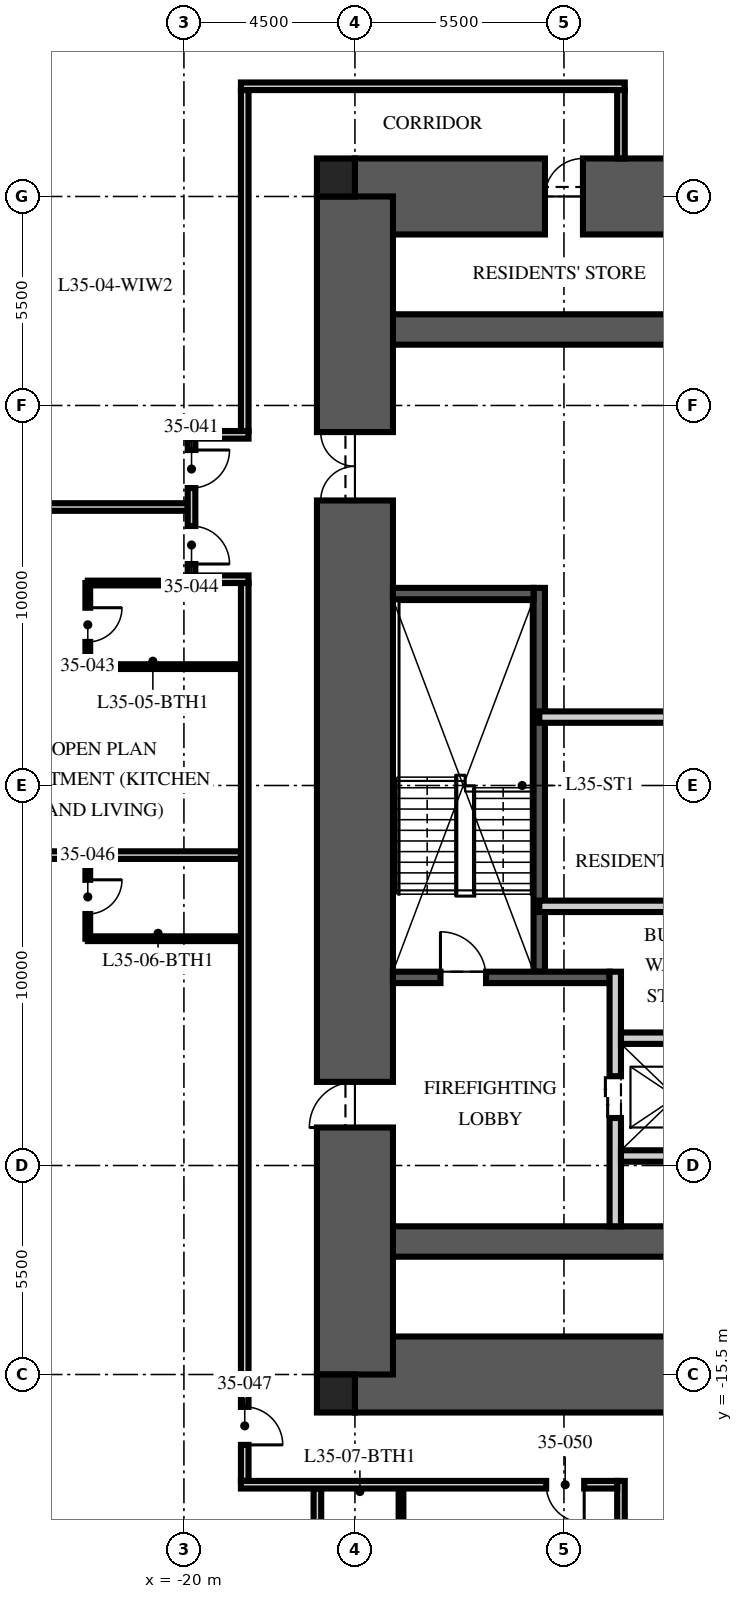
"""IFC4 building model, lengths in metres.
Left out: names, types, materials, properties, quantities, classifications, styles, units other than length and angle.
Written with IfcOpenShell. Run it as: python <this file> out.ifc"""

import sys

from ifc_helpers import new_model, si_unit, direction, frame, frame_2d, origin, origin_2d, place, context, subcontext, project, spatial, rectangle, extrude, element, fill, save


model = new_model("IFC4")
c1 = context("Model", 3, precision=1e-05, world=origin(), true_north=direction((0.0, 1.0)))
c2 = subcontext(c1, "Body", "Model", "MODEL_VIEW")
j1 = project(units=[si_unit("LENGTHUNIT", "METRE"), si_unit("PLANEANGLEUNIT", "RADIAN")], contexts=[c1])
p1 = place(None, origin())
s1 = spatial("IfcSite", under=j1, at=p1, CompositionType="ELEMENT")
p2 = place(p1, origin())
s2 = spatial("IfcBuilding", under=s1, at=p2, CompositionType="ELEMENT")
p3 = place(p2, frame((0.0, 0.0, 141.0)))
s3 = spatial("IfcBuildingStorey", under=s2, at=p3, CompositionType="ELEMENT", Elevation=141.0)
p4 = place(p3, frame((-15.5, 15.5, -0.25), z_axis=(0.0, 0.0, 1.0), x_axis=(1.0, 0.0, 0.0)))
e1 = element("IfcWall", 1, at=p4, inside=s3, PredefinedType="SHEAR", context=c2, shape_type="SweptSolid", body=[
    extrude(rectangle(XDim=31.0, YDim=2.0, at=frame_2d((15.5, 0.0))), origin(), (0.0, 0.0, 1.0), 3.75),
])
p5 = place(p4, frame((5.0, 0.0, 0.25)))
e2 = element("IfcOpeningElement", 2, at=p5, cuts=e1, PredefinedType="OPENING", context=c2, shape_type="SweptSolid", body=[
    extrude(rectangle(XDim=1.0, YDim=2.1, at=frame_2d((0.5, 1.05))), frame((0.0, 1.01, 0.0), z_axis=(0.0, -1.0, 0.0), x_axis=(1.0, 0.0, 0.0)), (0.0, 0.0, 1.0), 2.02),
])
p6 = place(p3, frame((-15.5, -15.5, -0.25), z_axis=(0.0, 0.0, 1.0), x_axis=(1.0, 0.0, 0.0)))
e3 = element("IfcWall", 3, at=p6, inside=s3, PredefinedType="SHEAR", context=c2, shape_type="SweptSolid", body=[
    extrude(rectangle(XDim=31.0, YDim=2.0, at=frame_2d((15.5, 0.0))), origin(), (0.0, 0.0, 1.0), 3.75),
])
p7 = place(p6, frame((10.4, 0.0, 0.25)))
e4 = element("IfcOpeningElement", 4, at=p7, cuts=e3, PredefinedType="OPENING", context=c2, shape_type="SweptSolid", body=[
    extrude(rectangle(XDim=1.1, YDim=2.1, at=frame_2d((0.55, 1.05))), frame((0.0, 1.01, 0.0), z_axis=(0.0, -1.0, 0.0), x_axis=(1.0, 0.0, 0.0)), (0.0, 0.0, 1.0), 2.02),
])
p8 = place(p6, frame((13.5, 0.0, 0.25)))
e5 = element("IfcOpeningElement", 5, at=p8, cuts=e3, PredefinedType="OPENING", context=c2, shape_type="SweptSolid", body=[
    extrude(rectangle(XDim=1.1, YDim=2.1, at=frame_2d((0.55, 1.05))), frame((0.0, 1.01, 0.0), z_axis=(0.0, -1.0, 0.0), x_axis=(1.0, 0.0, 0.0)), (0.0, 0.0, 1.0), 2.02),
])
p9 = place(p6, frame((16.6, 0.0, 0.25)))
e6 = element("IfcOpeningElement", 6, at=p9, cuts=e3, PredefinedType="OPENING", context=c2, shape_type="SweptSolid", body=[
    extrude(rectangle(XDim=1.1, YDim=2.1, at=frame_2d((0.55, 1.05))), frame((0.0, 1.01, 0.0), z_axis=(0.0, -1.0, 0.0), x_axis=(1.0, 0.0, 0.0)), (0.0, 0.0, 1.0), 2.02),
])
for number, where, z_axis, x_axis in (
    (7, (-15.5, 12.0, -0.25), (0.0, 0.0, 1.0), (1.0, 0.0, 0.0)),
    (8, (-15.5, -12.0, -0.25), (0.0, 0.0, 1.0), (1.0, 0.0, 0.0)),
):
    element("IfcWall", number, at=place(p3, frame(where, z_axis=z_axis, x_axis=x_axis)), inside=s3, PredefinedType="SHEAR", context=c2, shape_type="SweptSolid", body=[
        extrude(rectangle(XDim=31.0, YDim=0.8, at=frame_2d((15.5, 0.0))), origin(), (0.0, 0.0, 1.0), 3.75),
    ])
p10 = place(p3, frame((-15.5, -15.5, -0.25), z_axis=(0.0, 0.0, 1.0), x_axis=(0.0, 1.0, 0.0)))
e9 = element("IfcWall", 9, at=p10, inside=s3, PredefinedType="SHEAR", context=c2, shape_type="SweptSolid", body=[
    extrude(rectangle(XDim=31.0, YDim=2.0, at=frame_2d((15.5, 0.0))), origin(), (0.0, 0.0, 1.0), 3.75),
])
p11 = place(p10, frame((6.5, 0.0, 0.25)))
e10 = element("IfcOpeningElement", 10, at=p11, cuts=e9, PredefinedType="OPENING", context=c2, shape_type="SweptSolid", body=[
    extrude(rectangle(XDim=1.2, YDim=2.1, at=frame_2d((0.6, 1.05))), frame((0.0, 1.01, 0.0), z_axis=(0.0, -1.0, 0.0), x_axis=(1.0, 0.0, 0.0)), (0.0, 0.0, 1.0), 2.02),
])
p12 = place(p10, frame((23.0, 0.0, 0.25)))
e11 = element("IfcOpeningElement", 11, at=p12, cuts=e9, PredefinedType="OPENING", context=c2, shape_type="SweptSolid", body=[
    extrude(rectangle(XDim=1.8, YDim=2.1, at=frame_2d((0.9, 1.05))), frame((0.0, 1.01, 0.0), z_axis=(0.0, -1.0, 0.0), x_axis=(1.0, 0.0, 0.0)), (0.0, 0.0, 1.0), 2.02),
])
for number, where, z_axis, x_axis in (
    (12, (-16.0, 16.0, -0.25), (0.0, 0.0, 1.0), (1.0, 0.0, 0.0)),
    (13, (-16.0, -16.0, -0.25), (0.0, 0.0, 1.0), (1.0, 0.0, 0.0)),
):
    element("IfcColumn", number, at=place(p3, frame(where, z_axis=z_axis, x_axis=x_axis)), inside=s3, PredefinedType="COLUMN", context=c2, shape_type="SweptSolid", body=[
        extrude(rectangle(XDim=1.0, YDim=1.0, at=origin_2d()), origin(), (0.0, 0.0, 1.0), 3.75),
    ])
p13 = place(p3, frame((-10.65, -4.9, 0.0), z_axis=(0.0, 0.0, 1.0), x_axis=(0.0, 1.0, 0.0)))
e14 = element("IfcWall", 14, at=p13, inside=s3, PredefinedType="SOLIDWALL", context=c2, shape_type="SweptSolid", body=[
    extrude(rectangle(XDim=10.1, YDim=0.3, at=frame_2d((5.05, 0.0))), origin(), (0.0, 0.0, 1.0), 3.5),
])
p14 = place(p3, frame((-14.5, -5.05, 0.0), z_axis=(0.0, 0.0, 1.0), x_axis=(1.0, 0.0, 0.0)))
e15 = element("IfcWall", 15, at=p14, inside=s3, PredefinedType="SOLIDWALL", context=c2, shape_type="SweptSolid", body=[
    extrude(rectangle(XDim=5.7, YDim=0.3, at=frame_2d((2.85, 0.0))), origin(), (0.0, 0.0, 1.0), 3.5),
])
p15 = place(p14, frame((1.25, 0.0, 0.0)))
e16 = element("IfcOpeningElement", 16, at=p15, cuts=e15, PredefinedType="OPENING", context=c2, shape_type="SweptSolid", body=[
    extrude(rectangle(XDim=1.2, YDim=2.1, at=frame_2d((0.6, 1.05))), frame((0.0, 0.16, 0.0), z_axis=(0.0, -1.0, 0.0), x_axis=(1.0, 0.0, 0.0)), (0.0, 0.0, 1.0), 0.32),
])
p16 = place(p3, frame((-14.5, 5.05, 0.0), z_axis=(0.0, 0.0, 1.0), x_axis=(1.0, 0.0, 0.0)))
e17 = element("IfcWall", 17, at=p16, inside=s3, PredefinedType="SOLIDWALL", context=c2, shape_type="SweptSolid", body=[
    extrude(rectangle(XDim=3.7, YDim=0.3, at=frame_2d((1.85, 0.0))), origin(), (0.0, 0.0, 1.0), 3.5),
])
p17 = place(p3, frame((-8.65, -11.6, 0.0), z_axis=(0.0, 0.0, 1.0), x_axis=(0.0, 1.0, 0.0)))
e18 = element("IfcWall", 18, at=p17, inside=s3, PredefinedType="PARTITIONING", context=c2, shape_type="SweptSolid", body=[
    extrude(rectangle(XDim=6.7, YDim=0.3, at=frame_2d((3.35, 0.0))), origin(), (0.0, 0.0, 1.0), 3.5),
])
p18 = place(p17, frame((2.85, 0.0, 0.0)))
e19 = element("IfcOpeningElement", 19, at=p18, cuts=e18, PredefinedType="OPENING", context=c2, shape_type="SweptSolid", body=[
    extrude(rectangle(XDim=1.1, YDim=2.1, at=frame_2d((0.55, 1.05))), frame((0.0, 0.16, 0.0), z_axis=(0.0, -1.0, 0.0), x_axis=(1.0, 0.0, 0.0)), (0.0, 0.0, 1.0), 0.32),
])
p19 = place(p3, frame((-8.5, -6.65, 0.0), z_axis=(0.0, 0.0, 1.0), x_axis=(1.0, 0.0, 0.0)))
e20 = element("IfcWall", 20, at=p19, inside=s3, PredefinedType="PARTITIONING", context=c2, shape_type="SweptSolid", body=[
    extrude(rectangle(XDim=17.0, YDim=0.3, at=frame_2d((8.5, 0.0))), origin(), (0.0, 0.0, 1.0), 3.5),
])
p20 = place(p19, frame((7.8, 0.0, 0.0)))
e21 = element("IfcOpeningElement", 21, at=p20, cuts=e20, PredefinedType="OPENING", context=c2, shape_type="SweptSolid", body=[
    extrude(rectangle(XDim=1.3, YDim=2.4, at=frame_2d((0.65, 1.2))), frame((0.0, 0.16, 0.0), z_axis=(0.0, -1.0, 0.0), x_axis=(1.0, 0.0, 0.0)), (0.0, 0.0, 1.0), 0.32),
])
p21 = place(p19, frame((5.65, 0.0, 0.0)))
e22 = element("IfcOpeningElement", 22, at=p21, cuts=e20, PredefinedType="OPENING", context=c2, shape_type="SweptSolid", body=[
    extrude(rectangle(XDim=0.9, YDim=2.1, at=frame_2d((0.45, 1.05))), frame((0.0, 0.16, 0.0), z_axis=(0.0, -1.0, 0.0), x_axis=(1.0, 0.0, 0.0)), (0.0, 0.0, 1.0), 0.32),
])
p22 = place(p19, frame((10.4, 0.0, 0.0)))
e23 = element("IfcOpeningElement", 23, at=p22, cuts=e20, PredefinedType="OPENING", context=c2, shape_type="SweptSolid", body=[
    extrude(rectangle(XDim=0.9, YDim=2.1, at=frame_2d((0.45, 1.05))), frame((0.0, 0.16, 0.0), z_axis=(0.0, -1.0, 0.0), x_axis=(1.0, 0.0, 0.0)), (0.0, 0.0, 1.0), 0.32),
])
p23 = place(p3, frame((-8.5, -9.75, 0.0), z_axis=(0.0, 0.0, 1.0), x_axis=(1.0, 0.0, 0.0)))
e24 = element("IfcWall", 24, at=p23, inside=s3, PredefinedType="PARTITIONING", context=c2, shape_type="SweptSolid", body=[
    extrude(rectangle(XDim=2.9, YDim=0.3, at=frame_2d((1.45, 0.0))), origin(), (0.0, 0.0, 1.0), 3.5),
])
p24 = place(p3, frame((-10.65, 1.8, 0.0), z_axis=(0.0, 0.0, 1.0), x_axis=(1.0, 0.0, 0.0)))
e25 = element("IfcWall", 25, at=p24, inside=s3, PredefinedType="PARTITIONING", context=c2, shape_type="SweptSolid", body=[
    extrude(rectangle(XDim=21.3, YDim=0.3, at=frame_2d((10.65, 0.0))), origin(), (0.0, 0.0, 1.0), 3.5),
])
p25 = place(p24, frame((10.05, 0.0, 0.0)))
e26 = element("IfcOpeningElement", 26, at=p25, cuts=e25, PredefinedType="OPENING", context=c2, shape_type="SweptSolid", body=[
    extrude(rectangle(XDim=1.2, YDim=2.1, at=frame_2d((0.6, 1.05))), frame((0.0, 0.16, 0.0), z_axis=(0.0, -1.0, 0.0), x_axis=(1.0, 0.0, 0.0)), (0.0, 0.0, 1.0), 0.32),
])
p26 = place(p24, frame((19.238, 0.0, 0.0)))
e27 = element("IfcOpeningElement", 27, at=p26, cuts=e25, PredefinedType="OPENING", context=c2, shape_type="SweptSolid", body=[
    extrude(rectangle(XDim=0.9, YDim=2.1, at=frame_2d((0.45, 1.05))), frame((0.0, 0.16, 0.0), z_axis=(0.0, -1.0, 0.0), x_axis=(1.0, 0.0, 0.0)), (0.0, 0.0, 1.0), 0.32),
])
p27 = place(p3, frame((-10.65, -3.18, 0.0), z_axis=(0.0, 0.0, 1.0), x_axis=(1.0, 0.0, 0.0)))
e28 = element("IfcWall", 28, at=p27, inside=s3, PredefinedType="PARTITIONING", context=c2, shape_type="SweptSolid", body=[
    extrude(rectangle(XDim=6.45, YDim=0.3, at=frame_2d((3.225, 0.0))), origin(), (0.0, 0.0, 1.0), 3.5),
])
p28 = place(p3, frame((-18.5, 18.4, 0.0), z_axis=(0.0, 0.0, 1.0), x_axis=(1.0, 0.0, 0.0)))
e29 = element("IfcWall", 29, at=p28, inside=s3, PredefinedType="PARTITIONING", context=c2, shape_type="SweptSolid", body=[
    extrude(rectangle(XDim=10.1, YDim=0.2, at=frame_2d((5.05, 0.0))), origin(), (0.0, 0.0, 1.0), 2.3),
])
p29 = place(p3, frame((-8.5, 18.3, 0.0), z_axis=(0.0, 0.0, 1.0), x_axis=(0.0, -1.0, 0.0)))
e30 = element("IfcWall", 30, at=p29, inside=s3, PredefinedType="PARTITIONING", context=c2, shape_type="SweptSolid", body=[
    extrude(rectangle(XDim=1.8, YDim=0.2, at=frame_2d((0.9, 0.0))), origin(), (0.0, 0.0, 1.0), 3.5),
])
p30 = place(p3, frame((-19.9, 7.328, 0.0), z_axis=(0.0, 0.0, 1.0), x_axis=(-1.0, 0.0, 0.0)))
e31 = element("IfcWall", 31, at=p30, inside=s3, PredefinedType="PARTITIONING", context=c2, shape_type="SweptSolid", body=[
    extrude(rectangle(XDim=8.75, YDim=0.2, at=frame_2d((4.375, 0.0))), origin(), (0.0, 0.0, 1.0), 2.81),
])
for number, where, z_axis, x_axis in (
    (32, (-18.5, -1.832, 0.0), (0.0, 0.0, 1.0), (-1.0, 0.0, 0.0)),
    (33, (-16.488, -18.5, 0.0), (0.0, 0.0, 1.0), (0.0, -1.0, 0.0)),
):
    element("IfcWall", number, at=place(p3, frame(where, z_axis=z_axis, x_axis=x_axis)), inside=s3, PredefinedType="PARTITIONING", context=c2, shape_type="SweptSolid", body=[
        extrude(rectangle(XDim=10.15, YDim=0.2, at=frame_2d((5.075, 0.0))), origin(), (0.0, 0.0, 1.0), 2.81),
    ])
p31 = place(p3, frame((-22.53, 5.328, 0.0), z_axis=(0.0, 0.0, 1.0), x_axis=(0.0, -1.0, 0.0)))
e34 = element("IfcWall", 34, at=p31, inside=s3, PredefinedType="PARTITIONING", context=c2, shape_type="SweptSolid", body=[
    extrude(rectangle(XDim=2.2, YDim=0.125, at=frame_2d((1.1, 0.0))), origin(), (0.0, 0.0, 1.0), 2.81),
])
p32 = place(p31, frame((0.65, 0.0, 0.0)))
e35 = element("IfcOpeningElement", 35, at=p32, cuts=e34, PredefinedType="OPENING", context=c2, shape_type="SweptSolid", body=[
    extrude(rectangle(XDim=0.9, YDim=2.1, at=frame_2d((0.45, 1.05))), frame((0.0, 0.073, 0.0), z_axis=(0.0, -1.0, 0.0), x_axis=(1.0, 0.0, 0.0)), (0.0, 0.0, 1.0), 0.145),
])
p33 = place(p3, frame((-19.97, 5.328, 0.0), z_axis=(0.0, 0.0, 1.0), x_axis=(-1.0, 0.0, 0.0)))
e36 = element("IfcWall", 36, at=p33, inside=s3, PredefinedType="PARTITIONING", context=c2, shape_type="SweptSolid", body=[
    extrude(rectangle(XDim=2.56, YDim=0.125, at=frame_2d((1.28, 0.0))), origin(), (0.0, 0.0, 1.0), 3.5),
])
p34 = place(p3, frame((-18.5, 3.128, 0.0), z_axis=(0.0, 0.0, 1.0), x_axis=(-1.0, 0.0, 0.0)))
e37 = element("IfcWall", 37, at=p34, inside=s3, PredefinedType="PARTITIONING", context=c2, shape_type="SweptSolid", body=[
    extrude(rectangle(XDim=4.03, YDim=0.125, at=frame_2d((2.015, 0.0))), origin(), (0.0, 0.0, 1.0), 3.5),
])
p35 = place(p3, frame((-22.53, -1.832, 0.0), z_axis=(0.0, 0.0, 1.0), x_axis=(0.0, -1.0, 0.0)))
e38 = element("IfcWall", 38, at=p35, inside=s3, PredefinedType="PARTITIONING", context=c2, shape_type="SweptSolid", body=[
    extrude(rectangle(XDim=2.2, YDim=0.125, at=frame_2d((1.1, 0.0))), origin(), (0.0, 0.0, 1.0), 3.5),
])
p36 = place(p35, frame((0.65, 0.0, 0.0)))
e39 = element("IfcOpeningElement", 39, at=p36, cuts=e38, PredefinedType="OPENING", context=c2, shape_type="SweptSolid", body=[
    extrude(rectangle(XDim=0.9, YDim=2.1, at=frame_2d((0.45, 1.05))), frame((0.0, 0.073, 0.0), z_axis=(0.0, -1.0, 0.0), x_axis=(1.0, 0.0, 0.0)), (0.0, 0.0, 1.0), 0.145),
])
for number, where, z_axis, x_axis in (
    (40, (-18.5, -4.032, 0.0), (0.0, 0.0, 1.0), (-1.0, 0.0, 0.0)),
    (41, (-14.288, -18.5, 0.0), (0.0, 0.0, 1.0), (0.0, -1.0, 0.0)),
):
    element("IfcWall", number, at=place(p3, frame(where, z_axis=z_axis, x_axis=x_axis)), inside=s3, PredefinedType="PARTITIONING", context=c2, shape_type="SweptSolid", body=[
        extrude(rectangle(XDim=4.03, YDim=0.125, at=frame_2d((2.015, 0.0))), origin(), (0.0, 0.0, 1.0), 3.5),
    ])
p37 = place(p3, frame((-18.4, 18.3, 0.0), z_axis=(0.0, 0.0, 1.0), x_axis=(0.0, -1.0, 0.0)))
e42 = element("IfcWall", 42, at=p37, inside=s3, PredefinedType="PARTITIONING", context=c2, shape_type="SweptSolid", body=[
    extrude(rectangle(XDim=8.972, YDim=0.2, at=frame_2d((4.486, 0.0))), origin(), (0.0, 0.0, 1.0), 2.3),
])
p38 = place(p3, frame((-18.3, 9.228, 0.0), z_axis=(0.0, 0.0, 1.0), x_axis=(-1.0, 0.0, 0.0)))
e43 = element("IfcWall", 43, at=p38, inside=s3, PredefinedType="PARTITIONING", context=c2, shape_type="SweptSolid", body=[
    extrude(rectangle(XDim=1.6, YDim=0.2, at=frame_2d((0.8, 0.0))), origin(), (0.0, 0.0, 1.0), 2.7),
])
p39 = place(p3, frame((-18.3, 5.428, 0.0), z_axis=(0.0, 0.0, 1.0), x_axis=(-1.0, 0.0, 0.0)))
e44 = element("IfcWall", 44, at=p39, inside=s3, PredefinedType="PARTITIONING", context=c2, shape_type="SweptSolid", body=[
    extrude(rectangle(XDim=1.6, YDim=0.2, at=frame_2d((0.8, 0.0))), origin(), (0.0, 0.0, 1.0), 3.5),
])
p40 = place(p3, frame((-19.8, 9.128, 0.0), z_axis=(0.0, 0.0, 1.0), x_axis=(0.0, -1.0, 0.0)))
e45 = element("IfcWall", 45, at=p40, inside=s3, PredefinedType="PARTITIONING", context=c2, shape_type="SweptSolid", body=[
    extrude(rectangle(XDim=3.6, YDim=0.2, at=frame_2d((1.8, 0.0))), origin(), (0.0, 0.0, 1.0), 2.7),
])
p41 = place(p40, frame((0.3, 0.0, 0.0)))
e46 = element("IfcOpeningElement", 46, at=p41, cuts=e45, PredefinedType="OPENING", context=c2, shape_type="SweptSolid", body=[
    extrude(rectangle(XDim=1.0, YDim=2.2, at=frame_2d((0.5, 1.1))), frame((0.0, 0.11, 0.0), z_axis=(0.0, -1.0, 0.0), x_axis=(1.0, 0.0, 0.0)), (0.0, 0.0, 1.0), 0.22),
])
p42 = place(p40, frame((2.3, 0.0, 0.0)))
e47 = element("IfcOpeningElement", 47, at=p42, cuts=e45, PredefinedType="OPENING", context=c2, shape_type="SweptSolid", body=[
    extrude(rectangle(XDim=1.0, YDim=2.2, at=frame_2d((0.5, 1.1))), frame((0.0, 0.11, 0.0), z_axis=(0.0, -1.0, 0.0), x_axis=(1.0, 0.0, 0.0)), (0.0, 0.0, 1.0), 0.22),
])
p43 = place(p3, frame((-18.4, 5.328, 0.0), z_axis=(0.0, 0.0, 1.0), x_axis=(0.0, -1.0, 0.0)))
e48 = element("IfcWall", 48, at=p43, inside=s3, PredefinedType="PARTITIONING", context=c2, shape_type="SweptSolid", body=[
    extrude(rectangle(XDim=23.628, YDim=0.2, at=frame_2d((11.814, 0.0))), origin(), (0.0, 0.0, 1.0), 2.3),
])
p44 = place(p43, frame((21.68, 0.0, 0.0)))
e49 = element("IfcOpeningElement", 49, at=p44, cuts=e48, PredefinedType="OPENING", context=c2, shape_type="SweptSolid", body=[
    extrude(rectangle(XDim=1.0, YDim=2.2, at=frame_2d((0.5, 1.1))), frame((0.0, 0.11, 0.0), z_axis=(0.0, -1.0, 0.0), x_axis=(1.0, 0.0, 0.0)), (0.0, 0.0, 1.0), 0.22),
])
p45 = place(p3, frame((-8.5, -18.3, 0.0), z_axis=(0.0, 0.0, 1.0), x_axis=(0.0, -1.0, 0.0)))
e50 = element("IfcWall", 50, at=p45, inside=s3, PredefinedType="PARTITIONING", context=c2, shape_type="SweptSolid", body=[
    extrude(rectangle(XDim=3.0, YDim=0.2, at=frame_2d((1.5, 0.0))), origin(), (0.0, 0.0, 1.0), 3.5),
])
p46 = place(p3, frame((-8.6, -18.4, 0.0), z_axis=(0.0, 0.0, 1.0), x_axis=(-1.0, 0.0, 0.0)))
e51 = element("IfcWall", 51, at=p46, inside=s3, PredefinedType="PARTITIONING", context=c2, shape_type="SweptSolid", body=[
    extrude(rectangle(XDim=9.9, YDim=0.2, at=frame_2d((4.95, 0.0))), origin(), (0.0, 0.0, 1.0), 2.3),
])
p47 = place(p46, frame((0.868, 0.0, 0.0)))
e52 = element("IfcOpeningElement", 52, at=p47, cuts=e51, PredefinedType="OPENING", context=c2, shape_type="SweptSolid", body=[
    extrude(rectangle(XDim=1.0, YDim=2.2, at=frame_2d((0.5, 1.1))), frame((0.0, 0.11, 0.0), z_axis=(0.0, -1.0, 0.0), x_axis=(1.0, 0.0, 0.0)), (0.0, 0.0, 1.0), 0.22),
])
p48 = place(p15, origin())
e53 = element("IfcDoor", 53, at=p48, inside=s3, OperationType="SINGLE_SWING_LEFT", PredefinedType="DOOR", context=c2, shape_type="SweptSolid", body=[
    extrude(rectangle(XDim=1.2, YDim=2.1, at=frame_2d((0.6, 1.05))), frame((0.0, 0.025, 0.0), z_axis=(0.0, -1.0, 0.0), x_axis=(1.0, 0.0, 0.0)), (0.0, 0.0, 1.0), 0.05),
])
fill(e16, e53)
p49 = place(p11, origin())
e54 = element("IfcDoor", 54, at=p49, inside=s3, OperationType="SINGLE_SWING_LEFT", PredefinedType="DOOR", context=c2, shape_type="SweptSolid", body=[
    extrude(rectangle(XDim=1.2, YDim=2.1, at=frame_2d((0.6, 1.05))), frame((0.0, 0.025, 0.0), z_axis=(0.0, -1.0, 0.0), x_axis=(1.0, 0.0, 0.0)), (0.0, 0.0, 1.0), 0.05),
])
fill(e10, e54)
p50 = place(p12, origin())
e55 = element("IfcDoor", 55, at=p50, inside=s3, OperationType="DOUBLE_DOOR_SINGLE_SWING", PredefinedType="DOOR", context=c2, shape_type="SweptSolid", body=[
    extrude(rectangle(XDim=1.8, YDim=2.1, at=frame_2d((0.9, 1.05))), frame((0.0, 0.025, 0.0), z_axis=(0.0, -1.0, 0.0), x_axis=(1.0, 0.0, 0.0)), (0.0, 0.0, 1.0), 0.05),
])
fill(e11, e55)
p51 = place(p18, origin())
e56 = element("IfcDoor", 56, at=p51, inside=s3, OperationType="DOUBLE_DOOR_SLIDING", PredefinedType="DOOR", context=c2, shape_type="SweptSolid", body=[
    extrude(rectangle(XDim=1.1, YDim=2.1, at=frame_2d((0.55, 1.05))), frame((0.0, 0.025, 0.0), z_axis=(0.0, -1.0, 0.0), x_axis=(1.0, 0.0, 0.0)), (0.0, 0.0, 1.0), 0.05),
])
fill(e19, e56)
p52 = place(p5, origin())
e57 = element("IfcDoor", 57, at=p52, inside=s3, OperationType="SINGLE_SWING_RIGHT", PredefinedType="DOOR", context=c2, shape_type="SweptSolid", body=[
    extrude(rectangle(XDim=1.0, YDim=2.1, at=frame_2d((0.5, 1.05))), frame((0.0, 0.025, 0.0), z_axis=(0.0, -1.0, 0.0), x_axis=(1.0, 0.0, 0.0)), (0.0, 0.0, 1.0), 0.05),
])
fill(e2, e57)
p53 = place(p41, origin())
e58 = element("IfcDoor", 58, at=p53, inside=s3, OperationType="SINGLE_SWING_LEFT", PredefinedType="DOOR", context=c2, shape_type="SweptSolid", body=[
    extrude(rectangle(XDim=1.0, YDim=2.2, at=frame_2d((0.5, 1.1))), frame((0.0, 0.025, 0.0), z_axis=(0.0, -1.0, 0.0), x_axis=(1.0, 0.0, 0.0)), (0.0, 0.0, 1.0), 0.05),
])
fill(e46, e58)
p54 = place(p32, origin())
e59 = element("IfcDoor", 59, at=p54, inside=s3, OperationType="SINGLE_SWING_LEFT", PredefinedType="DOOR", context=c2, shape_type="SweptSolid", body=[
    extrude(rectangle(XDim=0.9, YDim=2.1, at=frame_2d((0.45, 1.05))), frame((0.0, 0.025, 0.0), z_axis=(0.0, -1.0, 0.0), x_axis=(1.0, 0.0, 0.0)), (0.0, 0.0, 1.0), 0.05),
])
fill(e35, e59)
p55 = place(p42, origin())
e60 = element("IfcDoor", 60, at=p55, inside=s3, OperationType="SINGLE_SWING_RIGHT", PredefinedType="DOOR", context=c2, shape_type="SweptSolid", body=[
    extrude(rectangle(XDim=1.0, YDim=2.2, at=frame_2d((0.5, 1.1))), frame((0.0, 0.025, 0.0), z_axis=(0.0, -1.0, 0.0), x_axis=(1.0, 0.0, 0.0)), (0.0, 0.0, 1.0), 0.05),
])
fill(e47, e60)
p56 = place(p36, origin())
e61 = element("IfcDoor", 61, at=p56, inside=s3, OperationType="SINGLE_SWING_LEFT", PredefinedType="DOOR", context=c2, shape_type="SweptSolid", body=[
    extrude(rectangle(XDim=0.9, YDim=2.1, at=frame_2d((0.45, 1.05))), frame((0.0, 0.025, 0.0), z_axis=(0.0, -1.0, 0.0), x_axis=(1.0, 0.0, 0.0)), (0.0, 0.0, 1.0), 0.05),
])
fill(e39, e61)
p57 = place(p44, origin())
e62 = element("IfcDoor", 62, at=p57, inside=s3, OperationType="SINGLE_SWING_RIGHT", PredefinedType="DOOR", context=c2, shape_type="SweptSolid", body=[
    extrude(rectangle(XDim=1.0, YDim=2.2, at=frame_2d((0.5, 1.1))), frame((0.0, 0.025, 0.0), z_axis=(0.0, -1.0, 0.0), x_axis=(1.0, 0.0, 0.0)), (0.0, 0.0, 1.0), 0.05),
])
fill(e49, e62)
p58 = place(p47, origin())
e63 = element("IfcDoor", 63, at=p58, inside=s3, OperationType="SINGLE_SWING_LEFT", PredefinedType="DOOR", context=c2, shape_type="SweptSolid", body=[
    extrude(rectangle(XDim=1.0, YDim=2.2, at=frame_2d((0.5, 1.1))), frame((0.0, 0.025, 0.0), z_axis=(0.0, -1.0, 0.0), x_axis=(1.0, 0.0, 0.0)), (0.0, 0.0, 1.0), 0.05),
])
fill(e52, e63)
save(model, sys.argv[1])
